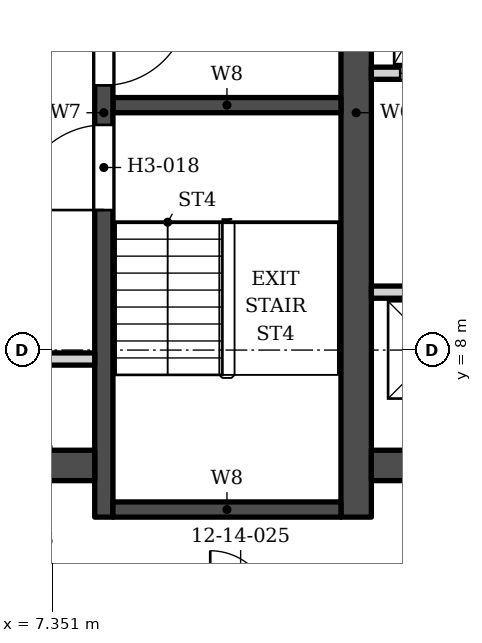
"""IFC4 building model, lengths in metres.
Left out: names, types, materials, properties, quantities, classifications, styles, units other than length and angle.
Written with IfcOpenShell. Run it as: python <this file> out.ifc"""

import sys

from ifc_helpers import new_model, si_unit, direction, frame, frame_2d, origin, place, context, subcontext, project, spatial, rectangle, extrude, element, fill, save


model = new_model("IFC4")
c1 = context("Model", 3, precision=1e-05, world=origin(), true_north=direction((0.0, 1.0)))
c2 = subcontext(c1, "Body", "Model", "MODEL_VIEW")
j1 = project(units=[si_unit("LENGTHUNIT", "METRE"), si_unit("PLANEANGLEUNIT", "RADIAN")], contexts=[c1])
p1 = place(None, origin())
s1 = spatial("IfcSite", under=j1, at=p1, CompositionType="ELEMENT")
p2 = place(p1, origin())
s2 = spatial("IfcBuilding", under=s1, at=p2, CompositionType="ELEMENT")
p3 = place(p2, frame((0.0, 0.0, 66.4)))
s3 = spatial("IfcBuildingStorey", under=s2, at=p3, CompositionType="ELEMENT", Elevation=66.4)
p4 = place(p3, frame((12.35, 5.253, 0.0), z_axis=(0.0, 0.0, 1.0), x_axis=(0.0, 1.0, 0.0)))
e1 = element("IfcWall", 1, at=p4, inside=s3, PredefinedType="SHEAR", context=c2, shape_type="SweptSolid", body=[
    extrude(rectangle(XDim=13.3, YDim=0.5, at=frame_2d((6.65, 0.0))), origin(), (0.0, 0.0, 1.0), 3.4),
])
p5 = place(p3, frame((8.2, 5.253, 0.0), z_axis=(0.0, 0.0, 1.0), x_axis=(0.0, 1.0, 0.0)))
e2 = element("IfcWall", 2, at=p5, inside=s3, PredefinedType="SHEAR", context=c2, shape_type="SweptSolid", body=[
    extrude(rectangle(XDim=13.3, YDim=0.3, at=frame_2d((6.65, 0.0))), origin(), (0.0, 0.0, 1.0), 3.4),
])
p6 = place(p5, frame((7.1, 0.0, 0.0)))
e3 = element("IfcOpeningElement", 3, at=p6, cuts=e2, PredefinedType="OPENING", context=c2, shape_type="SweptSolid", body=[
    extrude(rectangle(XDim=1.4, YDim=2.1, at=frame_2d((0.7, 1.05))), frame((0.0, 0.16, 0.0), z_axis=(0.0, -1.0, 0.0), x_axis=(1.0, 0.0, 0.0)), (0.0, 0.0, 1.0), 0.32),
])
p7 = place(p5, frame((5.05, 0.0, 0.0)))
e4 = element("IfcOpeningElement", 4, at=p7, cuts=e2, PredefinedType="OPENING", context=c2, shape_type="SweptSolid", body=[
    extrude(rectangle(XDim=1.4, YDim=2.1, at=frame_2d((0.7, 1.05))), frame((0.0, 0.16, 0.0), z_axis=(0.0, -1.0, 0.0), x_axis=(1.0, 0.0, 0.0)), (0.0, 0.0, 1.0), 0.32),
])
for number, where, z_axis, x_axis in (
    (5, (8.35, 12.028, 0.0), (0.0, 0.0, 1.0), (1.0, 0.0, 0.0)),
    (6, (8.35, 5.378, 0.0), (0.0, 0.0, 1.0), (1.0, 0.0, 0.0)),
):
    element("IfcWall", number, at=place(p3, frame(where, z_axis=z_axis, x_axis=x_axis)), inside=s3, PredefinedType="SHEAR", context=c2, shape_type="SweptSolid", body=[
        extrude(rectangle(XDim=3.75, YDim=0.25, at=frame_2d((1.875, 0.0))), origin(), (0.0, 0.0, 1.0), 3.4),
    ])
p8 = place(p3, frame((1.0, 6.103, 0.0), z_axis=(0.0, 0.0, 1.0), x_axis=(1.0, 0.0, 0.0)))
e7 = element("IfcWall", 7, at=p8, inside=s3, PredefinedType="SHEAR", context=c2, shape_type="SweptSolid", body=[
    extrude(rectangle(XDim=7.05, YDim=0.5, at=frame_2d((3.525, 0.0))), origin(), (0.0, 0.0, 1.0), 3.4),
])
p9 = place(p8, frame((5.325, 0.0, 0.0)))
e8 = element("IfcOpeningElement", 8, at=p9, cuts=e7, PredefinedType="OPENING", context=c2, shape_type="SweptSolid", body=[
    extrude(rectangle(XDim=0.9, YDim=2.1, at=frame_2d((0.45, 1.05))), frame((0.0, 0.26, 0.0), z_axis=(0.0, -1.0, 0.0), x_axis=(1.0, 0.0, 0.0)), (0.0, 0.0, 1.0), 0.52),
])
p10 = place(p3, frame((12.6, 6.103, 0.0), z_axis=(0.0, 0.0, 1.0), x_axis=(1.0, 0.0, 0.0)))
e9 = element("IfcWall", 9, at=p10, inside=s3, PredefinedType="SHEAR", context=c2, shape_type="SweptSolid", body=[
    extrude(rectangle(XDim=4.3, YDim=0.5, at=frame_2d((2.15, 0.0))), origin(), (0.0, 0.0, 1.0), 3.4),
])
p11 = place(p3, frame((5.55, 7.853, 0.0), z_axis=(0.0, 0.0, 1.0), x_axis=(1.0, 0.0, 0.0)))
e10 = element("IfcWall", 10, at=p11, inside=s3, PredefinedType="SOLIDWALL", context=c2, shape_type="SweptSolid", body=[
    extrude(rectangle(XDim=2.5, YDim=0.2, at=frame_2d((1.25, 0.0))), origin(), (0.0, 0.0, 1.0), 3.23),
])
p12 = place(p3, frame((12.6, 8.953, 0.0), z_axis=(0.0, 0.0, 1.0), x_axis=(1.0, 0.0, 0.0)))
e11 = element("IfcWall", 11, at=p12, inside=s3, PredefinedType="SOLIDWALL", context=c2, shape_type="SweptSolid", body=[
    extrude(rectangle(XDim=4.3, YDim=0.2, at=frame_2d((2.15, 0.0))), origin(), (0.0, 0.0, 1.0), 3.23),
])
p13 = place(p12, frame((0.525, 0.0, 0.0)))
e12 = element("IfcOpeningElement", 12, at=p13, cuts=e11, PredefinedType="OPENING", context=c2, shape_type="SweptSolid", body=[
    extrude(rectangle(XDim=1.1, YDim=2.1, at=frame_2d((0.55, 1.05))), frame((0.0, 0.11, 0.0), z_axis=(0.0, -1.0, 0.0), x_axis=(1.0, 0.0, 0.0)), (0.0, 0.0, 1.0), 0.22),
])
p14 = place(p12, frame((2.775, 0.0, 0.0)))
e13 = element("IfcOpeningElement", 13, at=p14, cuts=e11, PredefinedType="OPENING", context=c2, shape_type="SweptSolid", body=[
    extrude(rectangle(XDim=1.1, YDim=2.1, at=frame_2d((0.55, 1.05))), frame((0.0, 0.11, 0.0), z_axis=(0.0, -1.0, 0.0), x_axis=(1.0, 0.0, 0.0)), (0.0, 0.0, 1.0), 0.22),
])
p15 = place(p3, frame((12.6, 12.552, 0.0), z_axis=(0.0, 0.0, 1.0), x_axis=(1.0, 0.0, 0.0)))
e14 = element("IfcWall", 14, at=p15, inside=s3, PredefinedType="SOLIDWALL", context=c2, shape_type="SweptSolid", body=[
    extrude(rectangle(XDim=4.3, YDim=0.2, at=frame_2d((2.15, 0.0))), origin(), (0.0, 0.0, 1.0), 3.23),
])
p16 = place(p15, frame((0.475, 0.0, 0.0)))
e15 = element("IfcOpeningElement", 15, at=p16, cuts=e14, PredefinedType="OPENING", context=c2, shape_type="SweptSolid", body=[
    extrude(rectangle(XDim=1.2, YDim=2.1, at=frame_2d((0.6, 1.05))), frame((0.0, 0.11, 0.0), z_axis=(0.0, -1.0, 0.0), x_axis=(1.0, 0.0, 0.0)), (0.0, 0.0, 1.0), 0.22),
])
p17 = place(p15, frame((2.625, 0.0, 0.0)))
e16 = element("IfcOpeningElement", 16, at=p17, cuts=e14, PredefinedType="OPENING", context=c2, shape_type="SweptSolid", body=[
    extrude(rectangle(XDim=1.4, YDim=2.1, at=frame_2d((0.7, 1.05))), frame((0.0, 0.11, 0.0), z_axis=(0.0, -1.0, 0.0), x_axis=(1.0, 0.0, 0.0)), (0.0, 0.0, 1.0), 0.22),
])
p18 = place(p16, origin())
e17 = element("IfcDoor", 17, at=p18, inside=s3, OperationType="DOUBLE_DOOR_SLIDING", PredefinedType="DOOR", context=c2, shape_type="SweptSolid", body=[
    extrude(rectangle(XDim=1.2, YDim=2.1, at=frame_2d((0.6, 1.05))), frame((0.0, 0.025, 0.0), z_axis=(0.0, -1.0, 0.0), x_axis=(1.0, 0.0, 0.0)), (0.0, 0.0, 1.0), 0.05),
])
fill(e15, e17)
p19 = place(p6, origin())
e18 = element("IfcDoor", 18, at=p19, inside=s3, OperationType="SINGLE_SWING_RIGHT", PredefinedType="DOOR", context=c2, shape_type="SweptSolid", body=[
    extrude(rectangle(XDim=1.4, YDim=2.1, at=frame_2d((0.7, 1.05))), frame((0.0, 0.025, 0.0), z_axis=(0.0, -1.0, 0.0), x_axis=(1.0, 0.0, 0.0)), (0.0, 0.0, 1.0), 0.05),
])
fill(e3, e18)
p20 = place(p7, origin())
e19 = element("IfcDoor", 19, at=p20, inside=s3, OperationType="SINGLE_SWING_LEFT", PredefinedType="DOOR", context=c2, shape_type="SweptSolid", body=[
    extrude(rectangle(XDim=1.4, YDim=2.1, at=frame_2d((0.7, 1.05))), frame((0.0, 0.025, 0.0), z_axis=(0.0, -1.0, 0.0), x_axis=(1.0, 0.0, 0.0)), (0.0, 0.0, 1.0), 0.05),
])
fill(e4, e19)
save(model, sys.argv[1])
